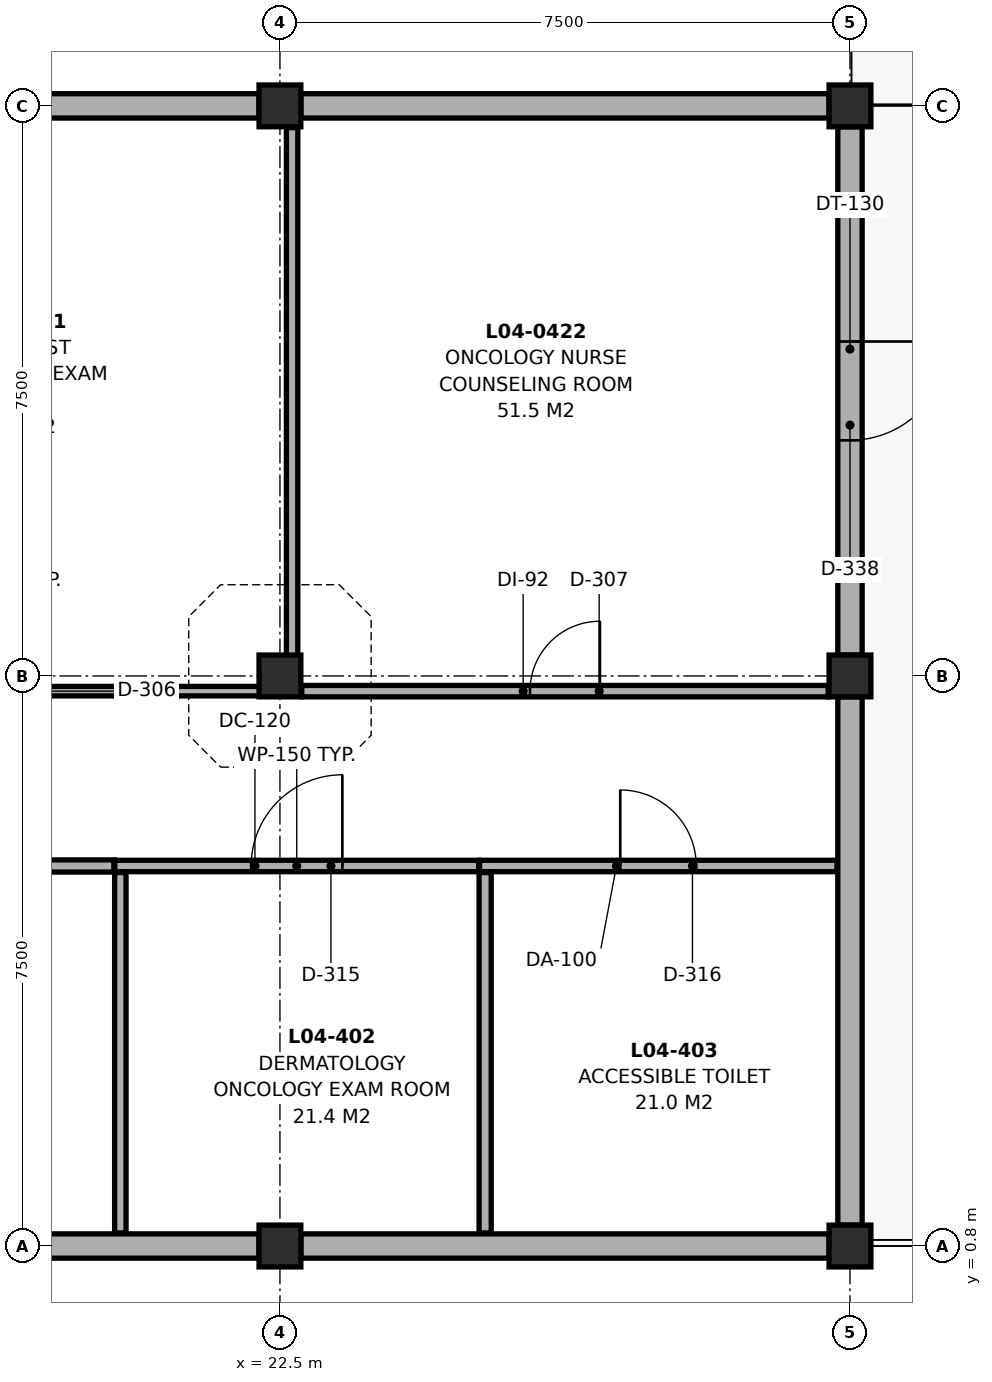
"""IFC4 building model, lengths in metres.
Left out: names, types, materials, properties, quantities, classifications, styles, units other than length and angle.
Written with IfcOpenShell. Run it as: python <this file> out.ifc"""

import sys

from ifc_helpers import new_model, si_unit, direction, frame, frame_2d, origin, origin_2d, place, context, subcontext, project, spatial, rectangle, extrude, element, fill, save


model = new_model("IFC4")
c1 = context("Model", 3, precision=1e-05, world=origin(), true_north=direction((0.0, 1.0)))
c2 = subcontext(c1, "Body", "Model", "MODEL_VIEW")
j1 = project(units=[si_unit("LENGTHUNIT", "METRE"), si_unit("PLANEANGLEUNIT", "RADIAN")], contexts=[c1])
p1 = place(None, origin())
s1 = spatial("IfcSite", under=j1, at=p1, CompositionType="ELEMENT")
p2 = place(p1, origin())
s2 = spatial("IfcBuilding", under=s1, at=p2, CompositionType="ELEMENT")
p3 = place(p2, frame((0.0, 0.0, 17.5)))
s3 = spatial("IfcBuildingStorey", under=s2, at=p3, CompositionType="ELEMENT", Elevation=17.5)
for number, where, z_axis, x_axis in (
    (1, (22.5, 0.8, 0.0), (0.0, 0.0, 1.0), (1.0, 0.0, 0.0)),
    (2, (22.5, 8.3, 0.0), (0.0, 0.0, 1.0), (1.0, 0.0, 0.0)),
    (3, (22.5, 15.8, 0.0), (0.0, 0.0, 1.0), (1.0, 0.0, 0.0)),
    (4, (30.0, 0.8, 0.0), (0.0, 0.0, 1.0), (1.0, 0.0, 0.0)),
    (5, (30.0, 8.3, 0.0), (0.0, 0.0, 1.0), (1.0, 0.0, 0.0)),
    (6, (30.0, 15.8, 0.0), (0.0, 0.0, 1.0), (1.0, 0.0, 0.0)),
):
    element("IfcColumn", number, at=place(p3, frame(where, z_axis=z_axis, x_axis=x_axis)), inside=s3, PredefinedType="COLUMN", context=c2, shape_type="SweptSolid", body=[
        extrude(rectangle(XDim=0.55, YDim=0.55, at=origin_2d()), origin(), (0.0, 0.0, 1.0), 3.72),
    ])
for number, where, z_axis, x_axis in (
    (7, (15.275, 15.8, 0.0), (0.0, 0.0, 1.0), (1.0, 0.0, 0.0)),
    (8, (22.775, 15.8, 0.0), (0.0, 0.0, 1.0), (1.0, 0.0, 0.0)),
):
    element("IfcWall", number, at=place(p3, frame(where, z_axis=z_axis, x_axis=x_axis)), inside=s3, PredefinedType="SOLIDWALL", context=c2, shape_type="SweptSolid", body=[
        extrude(rectangle(XDim=6.95, YDim=0.32, at=frame_2d((3.475, 0.0))), origin(), (0.0, 0.0, 1.0), 2.805),
    ])
p4 = place(p3, frame((30.0, 15.525, 0.0), z_axis=(0.0, 0.0, 1.0), x_axis=(0.0, -1.0, 0.0)))
e9 = element("IfcWall", 9, at=p4, inside=s3, PredefinedType="SOLIDWALL", context=c2, shape_type="SweptSolid", body=[
    extrude(rectangle(XDim=6.95, YDim=0.32, at=frame_2d((3.475, 0.0))), origin(), (0.0, 0.0, 1.0), 2.805),
])
p5 = place(p4, frame((2.825, 0.0, 0.0)))
e10 = element("IfcOpeningElement", 10, at=p5, cuts=e9, PredefinedType="OPENING", context=c2, shape_type="SweptSolid", body=[
    extrude(rectangle(XDim=1.3, YDim=2.2, at=frame_2d((0.65, 1.1))), frame((0.0, 0.172, 0.0), z_axis=(0.0, -1.0, 0.0), x_axis=(1.0, 0.0, 0.0)), (0.0, 0.0, 1.0), 0.344),
])
p6 = place(p3, frame((30.0, 8.025, 0.0), z_axis=(0.0, 0.0, 1.0), x_axis=(0.0, -1.0, 0.0)))
e11 = element("IfcWall", 11, at=p6, inside=s3, PredefinedType="SOLIDWALL", context=c2, shape_type="SweptSolid", body=[
    extrude(rectangle(XDim=6.95, YDim=0.32, at=frame_2d((3.475, 0.0))), origin(), (0.0, 0.0, 1.0), 2.805),
])
for number, where, z_axis, x_axis in (
    (12, (29.725, 0.8, 0.0), (0.0, 0.0, 1.0), (-1.0, 0.0, 0.0)),
    (13, (22.225, 0.8, 0.0), (0.0, 0.0, 1.0), (-1.0, 0.0, 0.0)),
):
    element("IfcWall", number, at=place(p3, frame(where, z_axis=z_axis, x_axis=x_axis)), inside=s3, PredefinedType="SOLIDWALL", context=c2, shape_type="SweptSolid", body=[
        extrude(rectangle(XDim=6.95, YDim=0.32, at=frame_2d((3.475, 0.0))), origin(), (0.0, 0.0, 1.0), 2.805),
    ])
p7 = place(p3, frame((15.485, 5.8, 0.0), z_axis=(0.0, 0.0, 1.0), x_axis=(1.0, 0.0, 0.0)))
e14 = element("IfcWall", 14, at=p7, inside=s3, PredefinedType="PARTITIONING", context=c2, shape_type="SweptSolid", body=[
    extrude(rectangle(XDim=4.83, YDim=0.16, at=frame_2d((2.415, 0.0))), origin(), (0.0, 0.0, 1.0), 3.7),
])
p8 = place(p7, frame((1.89, 0.0, 0.0)))
e15 = element("IfcOpeningElement", 15, at=p8, cuts=e14, PredefinedType="OPENING", context=c2, shape_type="SweptSolid", body=[
    extrude(rectangle(XDim=1.05, YDim=2.15, at=frame_2d((0.525, 1.075))), frame((0.0, 0.092, 0.0), z_axis=(0.0, -1.0, 0.0), x_axis=(1.0, 0.0, 0.0)), (0.0, 0.0, 1.0), 0.184),
])
p9 = place(p3, frame((20.327, 5.8, 0.0), z_axis=(0.0, 0.0, 1.0), x_axis=(1.0, 0.0, 0.0)))
e16 = element("IfcWall", 16, at=p9, inside=s3, PredefinedType="PARTITIONING", context=c2, shape_type="SweptSolid", body=[
    extrude(rectangle(XDim=4.788, YDim=0.15, at=frame_2d((2.394, 0.0))), origin(), (0.0, 0.0, 1.0), 2.805),
])
p10 = place(p9, frame((1.794, 0.0, 0.0)))
e17 = element("IfcOpeningElement", 17, at=p10, cuts=e16, PredefinedType="OPENING", context=c2, shape_type="SweptSolid", body=[
    extrude(rectangle(XDim=1.2, YDim=2.15, at=frame_2d((0.6, 1.075))), frame((0.0, 0.087, 0.0), z_axis=(0.0, -1.0, 0.0), x_axis=(1.0, 0.0, 0.0)), (0.0, 0.0, 1.0), 0.174),
])
p11 = place(p3, frame((25.127, 5.8, 0.0), z_axis=(0.0, 0.0, 1.0), x_axis=(1.0, 0.0, 0.0)))
e18 = element("IfcWall", 18, at=p11, inside=s3, PredefinedType="PARTITIONING", context=c2, shape_type="SweptSolid", body=[
    extrude(rectangle(XDim=4.701, YDim=0.15, at=frame_2d((2.351, 0.0))), origin(), (0.0, 0.0, 1.0), 3.055),
])
p12 = place(p11, frame((1.851, 0.0, 0.0)))
e19 = element("IfcOpeningElement", 19, at=p12, cuts=e18, PredefinedType="OPENING", context=c2, shape_type="SweptSolid", body=[
    extrude(rectangle(XDim=1.0, YDim=2.22, at=frame_2d((0.5, 1.11))), frame((0.0, 0.087, 0.0), z_axis=(0.0, -1.0, 0.0), x_axis=(1.0, 0.0, 0.0)), (0.0, 0.0, 1.0), 0.174),
])
p13 = place(p3, frame((15.287, 8.1, 0.0), z_axis=(0.0, 0.0, 1.0), x_axis=(1.0, 0.0, 0.0)))
e20 = element("IfcWall", 20, at=p13, inside=s3, PredefinedType="PARTITIONING", context=c2, shape_type="SweptSolid", body=[
    extrude(rectangle(XDim=7.121, YDim=0.125, at=frame_2d((3.561, 0.0))), origin(), (0.0, 0.0, 1.0), 2.805),
])
p14 = place(p13, frame((3.085, 0.0, 0.0)))
e21 = element("IfcOpeningElement", 21, at=p14, cuts=e20, PredefinedType="OPENING", context=c2, shape_type="SweptSolid", body=[
    extrude(rectangle(XDim=0.95, YDim=2.15, at=frame_2d((0.475, 1.075))), frame((0.0, 0.074, 0.0), z_axis=(0.0, -1.0, 0.0), x_axis=(1.0, 0.0, 0.0)), (0.0, 0.0, 1.0), 0.149),
])
p15 = place(p3, frame((22.787, 8.1, 0.0), z_axis=(0.0, 0.0, 1.0), x_axis=(1.0, 0.0, 0.0)))
e22 = element("IfcWall", 22, at=p15, inside=s3, PredefinedType="PARTITIONING", context=c2, shape_type="SweptSolid", body=[
    extrude(rectangle(XDim=6.926, YDim=0.15, at=frame_2d((3.463, 0.0))), origin(), (0.0, 0.0, 1.0), 2.805),
])
p16 = place(p15, frame((3.003, 0.0, 0.0)))
e23 = element("IfcOpeningElement", 23, at=p16, cuts=e22, PredefinedType="OPENING", context=c2, shape_type="SweptSolid", body=[
    extrude(rectangle(XDim=0.92, YDim=2.1, at=frame_2d((0.46, 1.05))), frame((0.0, 0.087, 0.0), z_axis=(0.0, -1.0, 0.0), x_axis=(1.0, 0.0, 0.0)), (0.0, 0.0, 1.0), 0.174),
])
p17 = place(p3, frame((20.4, 0.972, 0.0), z_axis=(0.0, 0.0, 1.0), x_axis=(0.0, 1.0, 0.0)))
e24 = element("IfcWall", 24, at=p17, inside=s3, PredefinedType="PARTITIONING", context=c2, shape_type="SweptSolid", body=[
    extrude(rectangle(XDim=4.741, YDim=0.15, at=frame_2d((2.371, 0.0))), origin(), (0.0, 0.0, 1.0), 3.055),
])
p18 = place(p3, frame((25.2, 0.972, 0.0), z_axis=(0.0, 0.0, 1.0), x_axis=(0.0, 1.0, 0.0)))
e25 = element("IfcWall", 25, at=p18, inside=s3, PredefinedType="PARTITIONING", context=c2, shape_type="SweptSolid", body=[
    extrude(rectangle(XDim=4.741, YDim=0.16, at=frame_2d((2.371, 0.0))), origin(), (0.0, 0.0, 1.0), 3.055),
])
p19 = place(p3, frame((22.66, 8.432, 0.0), z_axis=(0.0, 0.0, 1.0), x_axis=(0.0, 1.0, 0.0)))
e26 = element("IfcWall", 26, at=p19, inside=s3, PredefinedType="PARTITIONING", context=c2, shape_type="SweptSolid", body=[
    extrude(rectangle(XDim=7.081, YDim=0.15, at=frame_2d((3.541, 0.0))), origin(), (0.0, 0.0, 1.0), 2.805),
])
p20 = place(p5, origin())
e27 = element("IfcDoor", 27, at=p20, inside=s3, OperationType="SINGLE_SWING_LEFT", PredefinedType="DOOR", context=c2, shape_type="SweptSolid", body=[
    extrude(rectangle(XDim=1.3, YDim=2.2, at=frame_2d((0.65, 1.1))), frame((0.0, 0.025, 0.0), z_axis=(0.0, -1.0, 0.0), x_axis=(1.0, 0.0, 0.0)), (0.0, 0.0, 1.0), 0.05),
])
fill(e10, e27)
p21 = place(p10, origin())
e28 = element("IfcDoor", 28, at=p21, inside=s3, OperationType="SINGLE_SWING_RIGHT", PredefinedType="DOOR", context=c2, shape_type="SweptSolid", body=[
    extrude(rectangle(XDim=1.2, YDim=2.15, at=frame_2d((0.6, 1.075))), frame((0.0, 0.025, 0.0), z_axis=(0.0, -1.0, 0.0), x_axis=(1.0, 0.0, 0.0)), (0.0, 0.0, 1.0), 0.05),
])
fill(e17, e28)
p22 = place(p12, origin())
e29 = element("IfcDoor", 29, at=p22, inside=s3, OperationType="SINGLE_SWING_LEFT", PredefinedType="DOOR", context=c2, shape_type="SweptSolid", body=[
    extrude(rectangle(XDim=1.0, YDim=2.22, at=frame_2d((0.5, 1.11))), frame((0.0, 0.025, 0.0), z_axis=(0.0, -1.0, 0.0), x_axis=(1.0, 0.0, 0.0)), (0.0, 0.0, 1.0), 0.05),
])
fill(e19, e29)
p23 = place(p16, origin())
e30 = element("IfcDoor", 30, at=p23, inside=s3, OperationType="SINGLE_SWING_RIGHT", PredefinedType="DOOR", context=c2, shape_type="SweptSolid", body=[
    extrude(rectangle(XDim=0.92, YDim=2.1, at=frame_2d((0.46, 1.05))), frame((0.0, 0.025, 0.0), z_axis=(0.0, -1.0, 0.0), x_axis=(1.0, 0.0, 0.0)), (0.0, 0.0, 1.0), 0.05),
])
fill(e23, e30)
save(model, sys.argv[1])
